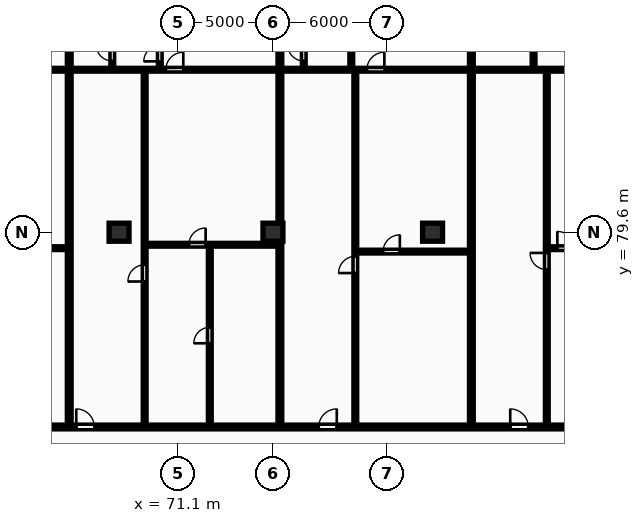
"""IFC4 building model, lengths in metres.
Left out: names, types, materials, properties, quantities, classifications, styles, units other than length and angle.
Written with IfcOpenShell. Run it as: python <this file> out.ifc"""

import sys

from ifc_helpers import new_model, si_unit, direction, frame, frame_2d, origin, origin_2d, place, context, subcontext, project, spatial, rectangle, extrude, element, fill, save


model = new_model("IFC4")
c1 = context("Model", 3, precision=1e-05, world=origin(), true_north=direction((0.0, 1.0)))
c2 = subcontext(c1, "Body", "Model", "MODEL_VIEW")
j1 = project(units=[si_unit("LENGTHUNIT", "METRE"), si_unit("PLANEANGLEUNIT", "RADIAN")], contexts=[c1])
p1 = place(None, origin())
s1 = spatial("IfcSite", under=j1, at=p1, CompositionType="ELEMENT")
p2 = place(p1, origin())
s2 = spatial("IfcBuilding", under=s1, at=p2, CompositionType="ELEMENT")
p3 = place(p2, frame((0.0, 0.0, 24.0)))
s3 = spatial("IfcBuildingStorey", under=s2, at=p3, CompositionType="ELEMENT", Elevation=24.0)
for number, where, z_axis, x_axis in (
    (1, (68.0, 79.6, 0.0), (0.0, 0.0, 1.0), (1.0, 0.0, 0.0)),
    (2, (76.1, 79.6, 0.0), (0.0, 0.0, 1.0), (1.0, 0.0, 0.0)),
    (3, (84.5, 79.6, 0.0), (0.0, 0.0, 1.0), (1.0, 0.0, 0.0)),
):
    element("IfcColumn", number, at=place(p3, frame(where, z_axis=z_axis, x_axis=x_axis)), inside=s3, PredefinedType="COLUMN", context=c2, shape_type="SweptSolid", body=[
        extrude(rectangle(XDim=1.05, YDim=0.95, at=origin_2d()), origin(), (0.0, 0.0, 1.0), 3.25),
    ])
p4 = place(p3, frame((65.378, 69.43, 0.0), z_axis=(0.0, 0.0, 1.0), x_axis=(0.0, 1.0, 0.0)))
e4 = element("IfcWall", 4, at=p4, inside=s3, PredefinedType="PARTITIONING", context=c2, shape_type="SweptSolid", body=[
    extrude(rectangle(XDim=29.07, YDim=0.2, at=frame_2d((14.535, 0.0))), origin(), (0.0, 0.0, 1.0), 2.97),
])
p5 = place(p3, frame((59.33, 78.76, 0.0), z_axis=(0.0, 0.0, 1.0), x_axis=(1.0, 0.0, 0.0)))
e5 = element("IfcWall", 5, at=p5, inside=s3, PredefinedType="PARTITIONING", context=c2, shape_type="SweptSolid", body=[
    extrude(rectangle(XDim=5.968, YDim=0.15, at=frame_2d((2.984, 0.0))), origin(), (0.0, 0.0, 1.0), 2.97),
])
p6 = place(p5, frame((2.544, 0.0, 0.0)))
e6 = element("IfcOpeningElement", 6, at=p6, cuts=e5, PredefinedType="OPENING", context=c2, shape_type="SweptSolid", body=[
    extrude(rectangle(XDim=0.88, YDim=2.06, at=frame_2d((0.44, 1.03))), frame((0.0, 0.085, 0.0), z_axis=(0.0, -1.0, 0.0), x_axis=(1.0, 0.0, 0.0)), (0.0, 0.0, 1.0), 0.17),
])
p7 = place(p3, frame((55.38, 88.15, 0.0), z_axis=(0.0, 0.0, 1.0), x_axis=(1.0, 0.0, 0.0)))
e7 = element("IfcWall", 7, at=p7, inside=s3, PredefinedType="PARTITIONING", context=c2, shape_type="SweptSolid", body=[
    extrude(rectangle(XDim=9.918, YDim=0.15, at=frame_2d((4.959, 0.0))), origin(), (0.0, 0.0, 1.0), 2.97),
])
p8 = place(p7, frame((4.499, 0.0, 0.0)))
e8 = element("IfcOpeningElement", 8, at=p8, cuts=e7, PredefinedType="OPENING", context=c2, shape_type="SweptSolid", body=[
    extrude(rectangle(XDim=0.92, YDim=2.08, at=frame_2d((0.46, 1.04))), frame((0.0, 0.085, 0.0), z_axis=(0.0, -1.0, 0.0), x_axis=(1.0, 0.0, 0.0)), (0.0, 0.0, 1.0), 0.17),
])
p9 = place(p3, frame((76.464, 69.43, 0.0), z_axis=(0.0, 0.0, 1.0), x_axis=(0.0, 1.0, 0.0)))
e9 = element("IfcWall", 9, at=p9, inside=s3, PredefinedType="PARTITIONING", context=c2, shape_type="SweptSolid", body=[
    extrude(rectangle(XDim=29.07, YDim=0.2, at=frame_2d((14.535, 0.0))), origin(), (0.0, 0.0, 1.0), 2.22),
])
p10 = place(p3, frame((72.776, 69.41, 0.0), z_axis=(0.0, 0.0, 1.0), x_axis=(0.0, 1.0, 0.0)))
e10 = element("IfcWall", 10, at=p10, inside=s3, PredefinedType="PARTITIONING", context=c2, shape_type="SweptSolid", body=[
    extrude(rectangle(XDim=9.53, YDim=0.15, at=frame_2d((4.765, 0.0))), origin(), (0.0, 0.0, 1.0), 2.97),
])
p11 = place(p10, frame((4.345, 0.0, 0.0)))
e11 = element("IfcOpeningElement", 11, at=p11, cuts=e10, PredefinedType="OPENING", context=c2, shape_type="SweptSolid", body=[
    extrude(rectangle(XDim=0.84, YDim=2.04, at=frame_2d((0.42, 1.02))), frame((0.0, 0.085, 0.0), z_axis=(0.0, -1.0, 0.0), x_axis=(1.0, 0.0, 0.0)), (0.0, 0.0, 1.0), 0.17),
])
p12 = place(p3, frame((69.408, 78.94, 0.0), z_axis=(0.0, 0.0, 1.0), x_axis=(1.0, 0.0, 0.0)))
e12 = element("IfcWall", 12, at=p12, inside=s3, PredefinedType="PARTITIONING", context=c2, shape_type="SweptSolid", body=[
    extrude(rectangle(XDim=6.976, YDim=0.15, at=frame_2d((3.488, 0.0))), origin(), (0.0, 0.0, 1.0), 2.97),
])
p13 = place(p12, frame((2.268, 0.0, 0.0)))
e13 = element("IfcOpeningElement", 13, at=p13, cuts=e12, PredefinedType="OPENING", context=c2, shape_type="SweptSolid", body=[
    extrude(rectangle(XDim=0.88, YDim=2.06, at=frame_2d((0.44, 1.03))), frame((0.0, 0.085, 0.0), z_axis=(0.0, -1.0, 0.0), x_axis=(1.0, 0.0, 0.0)), (0.0, 0.0, 1.0), 0.17),
])
p14 = place(p3, frame((69.348, 69.41, 0.0), z_axis=(0.0, 0.0, 1.0), x_axis=(0.0, 1.0, 0.0)))
e14 = element("IfcWall", 14, at=p14, inside=s3, PredefinedType="PARTITIONING", context=c2, shape_type="SweptSolid", body=[
    extrude(rectangle(XDim=18.7, YDim=0.15, at=frame_2d((9.35, 0.0))), origin(), (0.0, 0.0, 1.0), 2.97),
])
p15 = place(p14, frame((7.595, 0.0, 0.0)))
e15 = element("IfcOpeningElement", 15, at=p15, cuts=e14, PredefinedType="OPENING", context=c2, shape_type="SweptSolid", body=[
    extrude(rectangle(XDim=0.88, YDim=2.06, at=frame_2d((0.44, 1.03))), frame((0.0, 0.085, 0.0), z_axis=(0.0, -1.0, 0.0), x_axis=(1.0, 0.0, 0.0)), (0.0, 0.0, 1.0), 0.17),
])
p16 = place(p3, frame((67.644, 88.19, 0.0), z_axis=(0.0, 0.0, 1.0), x_axis=(0.0, 1.0, 0.0)))
e16 = element("IfcWall", 16, at=p16, inside=s3, PredefinedType="PARTITIONING", context=c2, shape_type="SweptSolid", body=[
    extrude(rectangle(XDim=5.0, YDim=0.15, at=frame_2d((2.5, 0.0))), origin(), (0.0, 0.0, 1.0), 2.22),
])
p17 = place(p16, frame((0.419, 0.0, 0.0)))
e17 = element("IfcOpeningElement", 17, at=p17, cuts=e16, PredefinedType="OPENING", context=c2, shape_type="SweptSolid", body=[
    extrude(rectangle(XDim=0.84, YDim=2.04, at=frame_2d((0.42, 1.02))), frame((0.0, 0.085, 0.0), z_axis=(0.0, -1.0, 0.0), x_axis=(1.0, 0.0, 0.0)), (0.0, 0.0, 1.0), 0.17),
])
p18 = place(p3, frame((70.144, 88.19, 0.0), z_axis=(0.0, 0.0, 1.0), x_axis=(0.0, 1.0, 0.0)))
e18 = element("IfcWall", 18, at=p18, inside=s3, PredefinedType="PARTITIONING", context=c2, shape_type="SweptSolid", body=[
    extrude(rectangle(XDim=5.0, YDim=0.15, at=frame_2d((2.5, 0.0))), origin(), (0.0, 0.0, 1.0), 2.97),
])
p19 = place(p18, frame((0.4, 0.0, 0.0)))
e19 = element("IfcOpeningElement", 19, at=p19, cuts=e18, PredefinedType="OPENING", context=c2, shape_type="SweptSolid", body=[
    extrude(rectangle(XDim=0.84, YDim=2.04, at=frame_2d((0.42, 1.02))), frame((0.0, 0.085, 0.0), z_axis=(0.0, -1.0, 0.0), x_axis=(1.0, 0.0, 0.0)), (0.0, 0.0, 1.0), 0.17),
])
p20 = place(p3, frame((65.458, 88.15, 0.0), z_axis=(0.0, 0.0, 1.0), x_axis=(1.0, 0.0, 0.0)))
e20 = element("IfcWall", 20, at=p20, inside=s3, PredefinedType="PARTITIONING", context=c2, shape_type="SweptSolid", body=[
    extrude(rectangle(XDim=10.926, YDim=0.15, at=frame_2d((5.463, 0.0))), origin(), (0.0, 0.0, 1.0), 2.97),
])
p21 = place(p20, frame((5.003, 0.0, 0.0)))
e21 = element("IfcOpeningElement", 21, at=p21, cuts=e20, PredefinedType="OPENING", context=c2, shape_type="SweptSolid", body=[
    extrude(rectangle(XDim=0.92, YDim=2.08, at=frame_2d((0.46, 1.04))), frame((0.0, 0.085, 0.0), z_axis=(0.0, -1.0, 0.0), x_axis=(1.0, 0.0, 0.0)), (0.0, 0.0, 1.0), 0.17),
])
p22 = place(p3, frame((86.542, 69.43, 0.0), z_axis=(0.0, 0.0, 1.0), x_axis=(0.0, 1.0, 0.0)))
e22 = element("IfcWall", 22, at=p22, inside=s3, PredefinedType="PARTITIONING", context=c2, shape_type="SweptSolid", body=[
    extrude(rectangle(XDim=29.07, YDim=0.2, at=frame_2d((14.535, 0.0))), origin(), (0.0, 0.0, 1.0), 2.97),
])
p23 = place(p3, frame((80.494, 78.58, 0.0), z_axis=(0.0, 0.0, 1.0), x_axis=(1.0, 0.0, 0.0)))
e23 = element("IfcWall", 23, at=p23, inside=s3, PredefinedType="PARTITIONING", context=c2, shape_type="SweptSolid", body=[
    extrude(rectangle(XDim=5.968, YDim=0.15, at=frame_2d((2.984, 0.0))), origin(), (0.0, 0.0, 1.0), 2.97),
])
p24 = place(p23, frame((1.403, 0.0, 0.0)))
e24 = element("IfcOpeningElement", 24, at=p24, cuts=e23, PredefinedType="OPENING", context=c2, shape_type="SweptSolid", body=[
    extrude(rectangle(XDim=0.88, YDim=2.06, at=frame_2d((0.44, 1.03))), frame((0.0, 0.085, 0.0), z_axis=(0.0, -1.0, 0.0), x_axis=(1.0, 0.0, 0.0)), (0.0, 0.0, 1.0), 0.17),
])
p25 = place(p3, frame((80.434, 69.41, 0.0), z_axis=(0.0, 0.0, 1.0), x_axis=(0.0, 1.0, 0.0)))
e25 = element("IfcWall", 25, at=p25, inside=s3, PredefinedType="PARTITIONING", context=c2, shape_type="SweptSolid", body=[
    extrude(rectangle(XDim=18.7, YDim=0.15, at=frame_2d((9.35, 0.0))), origin(), (0.0, 0.0, 1.0), 2.97),
])
p26 = place(p25, frame((8.04, 0.0, 0.0)))
e26 = element("IfcOpeningElement", 26, at=p26, cuts=e25, PredefinedType="OPENING", context=c2, shape_type="SweptSolid", body=[
    extrude(rectangle(XDim=0.88, YDim=2.06, at=frame_2d((0.44, 1.03))), frame((0.0, 0.085, 0.0), z_axis=(0.0, -1.0, 0.0), x_axis=(1.0, 0.0, 0.0)), (0.0, 0.0, 1.0), 0.17),
])
p27 = place(p3, frame((77.721, 88.19, 0.0), z_axis=(0.0, 0.0, 1.0), x_axis=(0.0, 1.0, 0.0)))
e27 = element("IfcWall", 27, at=p27, inside=s3, PredefinedType="PARTITIONING", context=c2, shape_type="SweptSolid", body=[
    extrude(rectangle(XDim=5.0, YDim=0.15, at=frame_2d((2.5, 0.0))), origin(), (0.0, 0.0, 1.0), 2.97),
])
p28 = place(p27, frame((0.419, 0.0, 0.0)))
e28 = element("IfcOpeningElement", 28, at=p28, cuts=e27, PredefinedType="OPENING", context=c2, shape_type="SweptSolid", body=[
    extrude(rectangle(XDim=0.84, YDim=2.04, at=frame_2d((0.42, 1.02))), frame((0.0, 0.085, 0.0), z_axis=(0.0, -1.0, 0.0), x_axis=(1.0, 0.0, 0.0)), (0.0, 0.0, 1.0), 0.17),
])
p29 = place(p3, frame((80.221, 88.19, 0.0), z_axis=(0.0, 0.0, 1.0), x_axis=(0.0, 1.0, 0.0)))
e29 = element("IfcWall", 29, at=p29, inside=s3, PredefinedType="PARTITIONING", context=c2, shape_type="SweptSolid", body=[
    extrude(rectangle(XDim=5.0, YDim=0.15, at=frame_2d((2.5, 0.0))), origin(), (0.0, 0.0, 1.0), 2.97),
])
p30 = place(p29, frame((2.08, 0.0, 0.0)))
e30 = element("IfcOpeningElement", 30, at=p30, cuts=e29, PredefinedType="OPENING", context=c2, shape_type="SweptSolid", body=[
    extrude(rectangle(XDim=0.84, YDim=2.04, at=frame_2d((0.42, 1.02))), frame((0.0, 0.085, 0.0), z_axis=(0.0, -1.0, 0.0), x_axis=(1.0, 0.0, 0.0)), (0.0, 0.0, 1.0), 0.17),
])
p31 = place(p3, frame((76.544, 88.15, 0.0), z_axis=(0.0, 0.0, 1.0), x_axis=(1.0, 0.0, 0.0)))
e31 = element("IfcWall", 31, at=p31, inside=s3, PredefinedType="PARTITIONING", context=c2, shape_type="SweptSolid", body=[
    extrude(rectangle(XDim=9.918, YDim=0.15, at=frame_2d((4.959, 0.0))), origin(), (0.0, 0.0, 1.0), 2.97),
])
p32 = place(p31, frame((4.499, 0.0, 0.0)))
e32 = element("IfcOpeningElement", 32, at=p32, cuts=e31, PredefinedType="OPENING", context=c2, shape_type="SweptSolid", body=[
    extrude(rectangle(XDim=0.92, YDim=2.08, at=frame_2d((0.46, 1.04))), frame((0.0, 0.085, 0.0), z_axis=(0.0, -1.0, 0.0), x_axis=(1.0, 0.0, 0.0)), (0.0, 0.0, 1.0), 0.17),
])
p33 = place(p3, frame((90.572, 78.76, 0.0), z_axis=(0.0, 0.0, 1.0), x_axis=(1.0, 0.0, 0.0)))
e33 = element("IfcWall", 33, at=p33, inside=s3, PredefinedType="PARTITIONING", context=c2, shape_type="SweptSolid", body=[
    extrude(rectangle(XDim=7.983, YDim=0.15, at=frame_2d((3.992, 0.0))), origin(), (0.0, 0.0, 1.0), 2.97),
])
p34 = place(p33, frame((0.495, 0.0, 0.0)))
e34 = element("IfcOpeningElement", 34, at=p34, cuts=e33, PredefinedType="OPENING", context=c2, shape_type="SweptSolid", body=[
    extrude(rectangle(XDim=0.88, YDim=2.06, at=frame_2d((0.44, 1.03))), frame((0.0, 0.085, 0.0), z_axis=(0.0, -1.0, 0.0), x_axis=(1.0, 0.0, 0.0)), (0.0, 0.0, 1.0), 0.17),
])
p35 = place(p3, frame((90.511, 69.41, 0.0), z_axis=(0.0, 0.0, 1.0), x_axis=(0.0, 1.0, 0.0)))
e35 = element("IfcWall", 35, at=p35, inside=s3, PredefinedType="PARTITIONING", context=c2, shape_type="SweptSolid", body=[
    extrude(rectangle(XDim=18.7, YDim=0.15, at=frame_2d((9.35, 0.0))), origin(), (0.0, 0.0, 1.0), 2.97),
])
p36 = place(p35, frame((8.22, 0.0, 0.0)))
e36 = element("IfcOpeningElement", 36, at=p36, cuts=e35, PredefinedType="OPENING", context=c2, shape_type="SweptSolid", body=[
    extrude(rectangle(XDim=0.88, YDim=2.06, at=frame_2d((0.44, 1.03))), frame((0.0, 0.085, 0.0), z_axis=(0.0, -1.0, 0.0), x_axis=(1.0, 0.0, 0.0)), (0.0, 0.0, 1.0), 0.17),
])
p37 = place(p3, frame((89.815, 88.19, 0.0), z_axis=(0.0, 0.0, 1.0), x_axis=(0.0, 1.0, 0.0)))
e37 = element("IfcWall", 37, at=p37, inside=s3, PredefinedType="PARTITIONING", context=c2, shape_type="SweptSolid", body=[
    extrude(rectangle(XDim=5.0, YDim=0.15, at=frame_2d((2.5, 0.0))), origin(), (0.0, 0.0, 1.0), 2.97),
])
p38 = place(p37, frame((2.08, 0.0, 0.0)))
e38 = element("IfcOpeningElement", 38, at=p38, cuts=e37, PredefinedType="OPENING", context=c2, shape_type="SweptSolid", body=[
    extrude(rectangle(XDim=0.84, YDim=2.04, at=frame_2d((0.42, 1.02))), frame((0.0, 0.085, 0.0), z_axis=(0.0, -1.0, 0.0), x_axis=(1.0, 0.0, 0.0)), (0.0, 0.0, 1.0), 0.17),
])
p39 = place(p3, frame((86.622, 88.15, 0.0), z_axis=(0.0, 0.0, 1.0), x_axis=(1.0, 0.0, 0.0)))
e39 = element("IfcWall", 39, at=p39, inside=s3, PredefinedType="PARTITIONING", context=c2, shape_type="SweptSolid", body=[
    extrude(rectangle(XDim=11.933, YDim=0.15, at=frame_2d((5.967, 0.0))), origin(), (0.0, 0.0, 1.0), 2.97),
])
p40 = place(p39, frame((5.914, 0.0, 0.0)))
e40 = element("IfcOpeningElement", 40, at=p40, cuts=e39, PredefinedType="OPENING", context=c2, shape_type="SweptSolid", body=[
    extrude(rectangle(XDim=0.92, YDim=2.08, at=frame_2d((0.46, 1.04))), frame((0.0, 0.085, 0.0), z_axis=(0.0, -1.0, 0.0), x_axis=(1.0, 0.0, 0.0)), (0.0, 0.0, 1.0), 0.17),
])
p41 = place(p3, frame((55.3, 69.35, 0.0), z_axis=(0.0, 0.0, 1.0), x_axis=(1.0, 0.0, 0.0)))
e41 = element("IfcWall", 41, at=p41, inside=s3, PredefinedType="PARTITIONING", context=c2, shape_type="SweptSolid", body=[
    extrude(rectangle(XDim=77.6, YDim=0.2, at=frame_2d((38.8, 0.0))), origin(), (0.0, 0.0, 1.0), 2.97),
])
p42 = place(p41, frame((1.81, 0.0, 0.0)))
e42 = element("IfcOpeningElement", 42, at=p42, cuts=e41, PredefinedType="OPENING", context=c2, shape_type="SweptSolid", body=[
    extrude(rectangle(XDim=0.95, YDim=2.15, at=frame_2d((0.475, 1.075))), frame((0.0, 0.11, 0.0), z_axis=(0.0, -1.0, 0.0), x_axis=(1.0, 0.0, 0.0)), (0.0, 0.0, 1.0), 0.22),
])
p43 = place(p41, frame((10.448, 0.0, 0.0)))
e43 = element("IfcOpeningElement", 43, at=p43, cuts=e41, PredefinedType="OPENING", context=c2, shape_type="SweptSolid", body=[
    extrude(rectangle(XDim=0.95, YDim=2.15, at=frame_2d((0.475, 1.075))), frame((0.0, 0.11, 0.0), z_axis=(0.0, -1.0, 0.0), x_axis=(1.0, 0.0, 0.0)), (0.0, 0.0, 1.0), 0.22),
])
p44 = place(p41, frame((23.208, 0.0, 0.0)))
e44 = element("IfcOpeningElement", 44, at=p44, cuts=e41, PredefinedType="OPENING", context=c2, shape_type="SweptSolid", body=[
    extrude(rectangle(XDim=0.95, YDim=2.15, at=frame_2d((0.475, 1.075))), frame((0.0, 0.11, 0.0), z_axis=(0.0, -1.0, 0.0), x_axis=(1.0, 0.0, 0.0)), (0.0, 0.0, 1.0), 0.22),
])
p45 = place(p41, frame((33.287, 0.0, 0.0)))
e45 = element("IfcOpeningElement", 45, at=p45, cuts=e41, PredefinedType="OPENING", context=c2, shape_type="SweptSolid", body=[
    extrude(rectangle(XDim=0.95, YDim=2.15, at=frame_2d((0.475, 1.075))), frame((0.0, 0.11, 0.0), z_axis=(0.0, -1.0, 0.0), x_axis=(1.0, 0.0, 0.0)), (0.0, 0.0, 1.0), 0.22),
])
p46 = place(p41, frame((44.905, 0.0, 0.0)))
e46 = element("IfcOpeningElement", 46, at=p46, cuts=e41, PredefinedType="OPENING", context=c2, shape_type="SweptSolid", body=[
    extrude(rectangle(XDim=0.95, YDim=2.15, at=frame_2d((0.475, 1.075))), frame((0.0, 0.11, 0.0), z_axis=(0.0, -1.0, 0.0), x_axis=(1.0, 0.0, 0.0)), (0.0, 0.0, 1.0), 0.22),
])
p47 = place(p41, frame((54.119, 0.0, 0.0)))
e47 = element("IfcOpeningElement", 47, at=p47, cuts=e41, PredefinedType="OPENING", context=c2, shape_type="SweptSolid", body=[
    extrude(rectangle(XDim=0.95, YDim=2.15, at=frame_2d((0.475, 1.075))), frame((0.0, 0.11, 0.0), z_axis=(0.0, -1.0, 0.0), x_axis=(1.0, 0.0, 0.0)), (0.0, 0.0, 1.0), 0.22),
])
p48 = place(p41, frame((66.74, 0.0, 0.0)))
e48 = element("IfcOpeningElement", 48, at=p48, cuts=e41, PredefinedType="OPENING", context=c2, shape_type="SweptSolid", body=[
    extrude(rectangle(XDim=0.95, YDim=2.15, at=frame_2d((0.475, 1.075))), frame((0.0, 0.11, 0.0), z_axis=(0.0, -1.0, 0.0), x_axis=(1.0, 0.0, 0.0)), (0.0, 0.0, 1.0), 0.22),
])
p49 = place(p11, origin())
e49 = element("IfcDoor", 49, at=p49, inside=s3, OperationType="SINGLE_SWING_LEFT", PredefinedType="DOOR", context=c2, shape_type="SweptSolid", body=[
    extrude(rectangle(XDim=0.84, YDim=2.04, at=frame_2d((0.42, 1.02))), frame((0.0, 0.025, 0.0), z_axis=(0.0, -1.0, 0.0), x_axis=(1.0, 0.0, 0.0)), (0.0, 0.0, 1.0), 0.05),
])
fill(e11, e49)
p50 = place(p13, origin())
e50 = element("IfcDoor", 50, at=p50, inside=s3, OperationType="SINGLE_SWING_RIGHT", PredefinedType="DOOR", context=c2, shape_type="SweptSolid", body=[
    extrude(rectangle(XDim=0.88, YDim=2.06, at=frame_2d((0.44, 1.03))), frame((0.0, 0.025, 0.0), z_axis=(0.0, -1.0, 0.0), x_axis=(1.0, 0.0, 0.0)), (0.0, 0.0, 1.0), 0.05),
])
fill(e13, e50)
p51 = place(p15, origin())
e51 = element("IfcDoor", 51, at=p51, inside=s3, OperationType="SINGLE_SWING_LEFT", PredefinedType="DOOR", context=c2, shape_type="SweptSolid", body=[
    extrude(rectangle(XDim=0.88, YDim=2.06, at=frame_2d((0.44, 1.03))), frame((0.0, 0.025, 0.0), z_axis=(0.0, -1.0, 0.0), x_axis=(1.0, 0.0, 0.0)), (0.0, 0.0, 1.0), 0.05),
])
fill(e15, e51)
p52 = place(p17, origin())
e52 = element("IfcDoor", 52, at=p52, inside=s3, OperationType="SINGLE_SWING_RIGHT", PredefinedType="DOOR", context=c2, shape_type="SweptSolid", body=[
    extrude(rectangle(XDim=0.84, YDim=2.04, at=frame_2d((0.42, 1.02))), frame((0.0, 0.025, 0.0), z_axis=(0.0, -1.0, 0.0), x_axis=(1.0, 0.0, 0.0)), (0.0, 0.0, 1.0), 0.05),
])
fill(e17, e52)
p53 = place(p19, origin())
e53 = element("IfcDoor", 53, at=p53, inside=s3, OperationType="SINGLE_SWING_LEFT", PredefinedType="DOOR", context=c2, shape_type="SweptSolid", body=[
    extrude(rectangle(XDim=0.84, YDim=2.04, at=frame_2d((0.42, 1.02))), frame((0.0, 0.025, 0.0), z_axis=(0.0, -1.0, 0.0), x_axis=(1.0, 0.0, 0.0)), (0.0, 0.0, 1.0), 0.05),
])
fill(e19, e53)
p54 = place(p21, origin())
e54 = element("IfcDoor", 54, at=p54, inside=s3, OperationType="SINGLE_SWING_RIGHT", PredefinedType="DOOR", context=c2, shape_type="SweptSolid", body=[
    extrude(rectangle(XDim=0.92, YDim=2.08, at=frame_2d((0.46, 1.04))), frame((0.0, 0.025, 0.0), z_axis=(0.0, -1.0, 0.0), x_axis=(1.0, 0.0, 0.0)), (0.0, 0.0, 1.0), 0.05),
])
fill(e21, e54)
p55 = place(p24, origin())
e55 = element("IfcDoor", 55, at=p55, inside=s3, OperationType="SINGLE_SWING_RIGHT", PredefinedType="DOOR", context=c2, shape_type="SweptSolid", body=[
    extrude(rectangle(XDim=0.88, YDim=2.06, at=frame_2d((0.44, 1.03))), frame((0.0, 0.025, 0.0), z_axis=(0.0, -1.0, 0.0), x_axis=(1.0, 0.0, 0.0)), (0.0, 0.0, 1.0), 0.05),
])
fill(e24, e55)
p56 = place(p26, origin())
e56 = element("IfcDoor", 56, at=p56, inside=s3, OperationType="SINGLE_SWING_LEFT", PredefinedType="DOOR", context=c2, shape_type="SweptSolid", body=[
    extrude(rectangle(XDim=0.88, YDim=2.06, at=frame_2d((0.44, 1.03))), frame((0.0, 0.025, 0.0), z_axis=(0.0, -1.0, 0.0), x_axis=(1.0, 0.0, 0.0)), (0.0, 0.0, 1.0), 0.05),
])
fill(e26, e56)
p57 = place(p28, origin())
e57 = element("IfcDoor", 57, at=p57, inside=s3, OperationType="SINGLE_SWING_RIGHT", PredefinedType="DOOR", context=c2, shape_type="SweptSolid", body=[
    extrude(rectangle(XDim=0.84, YDim=2.04, at=frame_2d((0.42, 1.02))), frame((0.0, 0.025, 0.0), z_axis=(0.0, -1.0, 0.0), x_axis=(1.0, 0.0, 0.0)), (0.0, 0.0, 1.0), 0.05),
])
fill(e28, e57)
p58 = place(p32, origin())
e58 = element("IfcDoor", 58, at=p58, inside=s3, OperationType="SINGLE_SWING_RIGHT", PredefinedType="DOOR", context=c2, shape_type="SweptSolid", body=[
    extrude(rectangle(XDim=0.92, YDim=2.08, at=frame_2d((0.46, 1.04))), frame((0.0, 0.025, 0.0), z_axis=(0.0, -1.0, 0.0), x_axis=(1.0, 0.0, 0.0)), (0.0, 0.0, 1.0), 0.05),
])
fill(e32, e58)
p59 = place(p34, origin())
e59 = element("IfcDoor", 59, at=p59, inside=s3, OperationType="SINGLE_SWING_LEFT", PredefinedType="DOOR", context=c2, shape_type="SweptSolid", body=[
    extrude(rectangle(XDim=0.88, YDim=2.06, at=frame_2d((0.44, 1.03))), frame((0.0, 0.025, 0.0), z_axis=(0.0, -1.0, 0.0), x_axis=(1.0, 0.0, 0.0)), (0.0, 0.0, 1.0), 0.05),
])
fill(e34, e59)
p60 = place(p36, origin())
e60 = element("IfcDoor", 60, at=p60, inside=s3, OperationType="SINGLE_SWING_RIGHT", PredefinedType="DOOR", context=c2, shape_type="SweptSolid", body=[
    extrude(rectangle(XDim=0.88, YDim=2.06, at=frame_2d((0.44, 1.03))), frame((0.0, 0.025, 0.0), z_axis=(0.0, -1.0, 0.0), x_axis=(1.0, 0.0, 0.0)), (0.0, 0.0, 1.0), 0.05),
])
fill(e36, e60)
p61 = place(p43, origin())
e61 = element("IfcDoor", 61, at=p61, inside=s3, OperationType="SINGLE_SWING_LEFT", PredefinedType="DOOR", context=c2, shape_type="SweptSolid", body=[
    extrude(rectangle(XDim=0.95, YDim=2.15, at=frame_2d((0.475, 1.075))), frame((0.0, 0.025, 0.0), z_axis=(0.0, -1.0, 0.0), x_axis=(1.0, 0.0, 0.0)), (0.0, 0.0, 1.0), 0.05),
])
fill(e43, e61)
p62 = place(p44, origin())
e62 = element("IfcDoor", 62, at=p62, inside=s3, OperationType="SINGLE_SWING_RIGHT", PredefinedType="DOOR", context=c2, shape_type="SweptSolid", body=[
    extrude(rectangle(XDim=0.95, YDim=2.15, at=frame_2d((0.475, 1.075))), frame((0.0, 0.025, 0.0), z_axis=(0.0, -1.0, 0.0), x_axis=(1.0, 0.0, 0.0)), (0.0, 0.0, 1.0), 0.05),
])
fill(e44, e62)
p63 = place(p45, origin())
e63 = element("IfcDoor", 63, at=p63, inside=s3, OperationType="SINGLE_SWING_LEFT", PredefinedType="DOOR", context=c2, shape_type="SweptSolid", body=[
    extrude(rectangle(XDim=0.95, YDim=2.15, at=frame_2d((0.475, 1.075))), frame((0.0, 0.025, 0.0), z_axis=(0.0, -1.0, 0.0), x_axis=(1.0, 0.0, 0.0)), (0.0, 0.0, 1.0), 0.05),
])
fill(e45, e63)
save(model, sys.argv[1])
